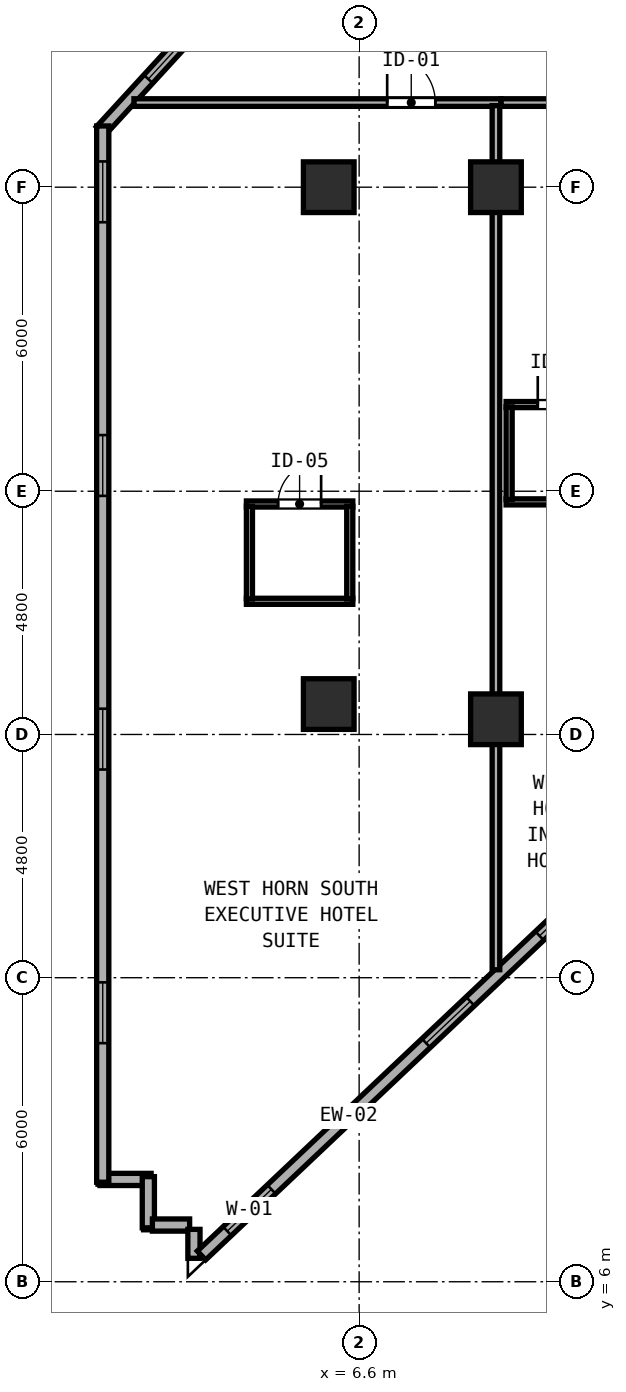
"""IFC4 building model, lengths in metres.
Left out: names, types, materials, properties, quantities, classifications, styles, units other than length and angle.
Written with IfcOpenShell. Run it as: python <this file> out.ifc"""

import sys

from ifc_helpers import new_model, si_unit, direction, frame, frame_2d, origin, origin_2d, place, context, subcontext, project, spatial, rectangle, hollow_rectangle, extrude, element, fill, save


model = new_model("IFC4")
c1 = context("Model", 3, precision=1e-05, world=origin(), true_north=direction((0.0, 1.0)))
c2 = subcontext(c1, "Body", "Model", "MODEL_VIEW")
j1 = project(units=[si_unit("LENGTHUNIT", "METRE"), si_unit("PLANEANGLEUNIT", "RADIAN")], contexts=[c1])
p1 = place(None, origin())
s1 = spatial("IfcSite", under=j1, at=p1, CompositionType="ELEMENT")
p2 = place(p1, origin())
s2 = spatial("IfcBuilding", under=s1, at=p2, CompositionType="ELEMENT")
p3 = place(p2, frame((0.0, 0.0, 59.0)))
s3 = spatial("IfcBuildingStorey", under=s2, at=p3, CompositionType="ELEMENT", Elevation=59.0)
for number, where, z_axis, x_axis in (
    (1, (6.0, 17.4, 0.0), (0.0, 0.0, 1.0), (1.0, 0.0, 0.0)),
    (2, (6.0, 27.6, 0.0), (0.0, 0.0, 1.0), (1.0, 0.0, 0.0)),
    (3, (9.3, 17.1, 0.0), (0.0, 0.0, 1.0), (1.0, 0.0, 0.0)),
    (4, (9.3, 27.6, 0.0), (0.0, 0.0, 1.0), (1.0, 0.0, 0.0)),
):
    element("IfcColumn", number, at=place(p3, frame(where, z_axis=z_axis, x_axis=x_axis)), inside=s3, PredefinedType="COLUMN", context=c2, shape_type="SweptSolid", body=[
        extrude(hollow_rectangle(XDim=1.0, YDim=1.0, WallThickness=0.038, at=origin_2d()), origin(), (0.0, 0.0, 1.0), 3.8),
    ])
for number, where, z_axis, x_axis in (
    (5, (1.485, 8.019, 0.0), (0.0, 0.0, 1.0), (1.0, 0.0, 0.0)),
    (6, (2.44, 8.074, 0.0), (0.0, 0.0, 1.0), (0.0, -1.0, 0.0)),
):
    element("IfcWall", number, at=place(p3, frame(where, z_axis=z_axis, x_axis=x_axis)), inside=s3, PredefinedType="SOLIDWALL", context=c2, shape_type="SweptSolid", body=[
        extrude(rectangle(XDim=1.01, YDim=0.24, at=frame_2d((0.505, 0.0))), origin(), (0.0, 0.0, 1.0), 3.6),
    ])
p4 = place(p3, frame((2.52, 7.119, 0.0), z_axis=(0.0, 0.0, 1.0), x_axis=(1.0, 0.0, 0.0)))
e7 = element("IfcWall", 7, at=p4, inside=s3, PredefinedType="SOLIDWALL", context=c2, shape_type="SweptSolid", body=[
    extrude(rectangle(XDim=0.735, YDim=0.24, at=frame_2d((0.367, 0.0))), origin(), (0.0, 0.0, 1.0), 3.6),
])
p5 = place(p3, frame((3.34, 7.034, 0.0), z_axis=(0.0, 0.0, 1.0), x_axis=(0.0, -1.0, 0.0)))
e8 = element("IfcWall", 8, at=p5, inside=s3, PredefinedType="SOLIDWALL", context=c2, shape_type="SweptSolid", body=[
    extrude(rectangle(XDim=0.571, YDim=0.24, at=frame_2d((0.286, 0.0))), origin(), (0.0, 0.0, 1.0), 3.6),
])
p6 = place(p3, frame((3.489, 6.518, 0.0), z_axis=(0.0, 0.0, 1.0), x_axis=(0.726640160789, 0.687018250652, 0.0)))
e9 = element("IfcWall", 9, at=p6, inside=s3, PredefinedType="SOLIDWALL", context=c2, shape_type="SweptSolid", body=[
    extrude(rectangle(XDim=11.603, YDim=0.24, at=frame_2d((5.801, 0.0))), origin(), (0.0, 0.0, 1.0), 3.6),
])
p7 = place(p6, frame((0.7, 0.0, 0.85)))
e10 = element("IfcOpeningElement", 10, at=p7, cuts=e9, PredefinedType="OPENING", context=c2, shape_type="SweptSolid", body=[
    extrude(rectangle(XDim=1.2, YDim=1.85, at=frame_2d((0.6, 0.925))), frame((0.0, 0.13, 0.0), z_axis=(0.0, -1.0, 0.0), x_axis=(1.0, 0.0, 0.0)), (0.0, 0.0, 1.0), 0.26),
])
p8 = place(p6, frame((6.1, 0.0, 0.85)))
e11 = element("IfcOpeningElement", 11, at=p8, cuts=e9, PredefinedType="OPENING", context=c2, shape_type="SweptSolid", body=[
    extrude(rectangle(XDim=1.2, YDim=1.85, at=frame_2d((0.6, 0.925))), frame((0.0, 0.13, 0.0), z_axis=(0.0, -1.0, 0.0), x_axis=(1.0, 0.0, 0.0)), (0.0, 0.0, 1.0), 0.26),
])
p9 = place(p6, frame((9.18, 0.0, 0.85)))
e12 = element("IfcOpeningElement", 12, at=p9, cuts=e9, PredefinedType="OPENING", context=c2, shape_type="SweptSolid", body=[
    extrude(rectangle(XDim=1.2, YDim=1.85, at=frame_2d((0.6, 0.925))), frame((0.0, 0.13, 0.0), z_axis=(0.0, -1.0, 0.0), x_axis=(1.0, 0.0, 0.0)), (0.0, 0.0, 1.0), 0.26),
])
p10 = place(p3, frame((3.723, 31.135, 0.0), z_axis=(0.0, 0.0, 1.0), x_axis=(-0.675788561887, -0.737095529509, 0.0)))
e13 = element("IfcWall", 13, at=p10, inside=s3, PredefinedType="SOLIDWALL", context=c2, shape_type="SweptSolid", body=[
    extrude(rectangle(XDim=3.285, YDim=0.24, at=frame_2d((1.643, 0.0))), origin(), (0.0, 0.0, 1.0), 3.6),
])
p11 = place(p10, frame((0.7, 0.0, 0.85)))
e14 = element("IfcOpeningElement", 14, at=p11, cuts=e13, PredefinedType="OPENING", context=c2, shape_type="SweptSolid", body=[
    extrude(rectangle(XDim=1.2, YDim=1.85, at=frame_2d((0.6, 0.925))), frame((0.0, 0.13, 0.0), z_axis=(0.0, -1.0, 0.0), x_axis=(1.0, 0.0, 0.0)), (0.0, 0.0, 1.0), 0.26),
])
p12 = place(p3, frame((1.54, 28.808, 0.0), z_axis=(0.0, 0.0, 1.0), x_axis=(0.0, -1.0, 0.0)))
e15 = element("IfcWall", 15, at=p12, inside=s3, PredefinedType="SOLIDWALL", context=c2, shape_type="SweptSolid", body=[
    extrude(rectangle(XDim=20.844, YDim=0.24, at=frame_2d((10.422, 0.0))), origin(), (0.0, 0.0, 1.0), 3.6),
])
p13 = place(p12, frame((0.7, 0.0, 0.85)))
e16 = element("IfcOpeningElement", 16, at=p13, cuts=e15, PredefinedType="OPENING", context=c2, shape_type="SweptSolid", body=[
    extrude(rectangle(XDim=1.2, YDim=1.85, at=frame_2d((0.6, 0.925))), frame((0.0, 0.13, 0.0), z_axis=(0.0, -1.0, 0.0), x_axis=(1.0, 0.0, 0.0)), (0.0, 0.0, 1.0), 0.26),
])
p14 = place(p12, frame((6.1, 0.0, 0.85)))
e17 = element("IfcOpeningElement", 17, at=p14, cuts=e15, PredefinedType="OPENING", context=c2, shape_type="SweptSolid", body=[
    extrude(rectangle(XDim=1.2, YDim=1.85, at=frame_2d((0.6, 0.925))), frame((0.0, 0.13, 0.0), z_axis=(0.0, -1.0, 0.0), x_axis=(1.0, 0.0, 0.0)), (0.0, 0.0, 1.0), 0.26),
])
p15 = place(p12, frame((11.5, 0.0, 0.85)))
e18 = element("IfcOpeningElement", 18, at=p15, cuts=e15, PredefinedType="OPENING", context=c2, shape_type="SweptSolid", body=[
    extrude(rectangle(XDim=1.2, YDim=1.85, at=frame_2d((0.6, 0.925))), frame((0.0, 0.13, 0.0), z_axis=(0.0, -1.0, 0.0), x_axis=(1.0, 0.0, 0.0)), (0.0, 0.0, 1.0), 0.26),
])
p16 = place(p12, frame((16.9, 0.0, 0.85)))
e19 = element("IfcOpeningElement", 19, at=p16, cuts=e15, PredefinedType="OPENING", context=c2, shape_type="SweptSolid", body=[
    extrude(rectangle(XDim=1.2, YDim=1.85, at=frame_2d((0.6, 0.925))), frame((0.0, 0.13, 0.0), z_axis=(0.0, -1.0, 0.0), x_axis=(1.0, 0.0, 0.0)), (0.0, 0.0, 1.0), 0.26),
])
p17 = place(p3, frame((2.156, 29.27, 0.0), z_axis=(0.0, 0.0, 1.0), x_axis=(1.0, 0.0, 0.0)))
e20 = element("IfcWall", 20, at=p17, inside=s3, PredefinedType="PARTITIONING", context=c2, shape_type="SweptSolid", body=[
    extrude(rectangle(XDim=7.244, YDim=0.15, at=frame_2d((3.622, 0.0))), origin(), (0.0, 0.0, 1.0), 3.6),
])
p18 = place(p17, frame((5.947, 0.0, 0.0), z_axis=(0.0, 0.0, 1.0), x_axis=(-1.0, 0.0, 0.0)))
e21 = element("IfcOpeningElement", 21, at=p18, cuts=e20, PredefinedType="OPENING", context=c2, shape_type="SweptSolid", body=[
    extrude(rectangle(XDim=0.95, YDim=2.18, at=frame_2d((0.475, 1.09))), frame((0.0, 0.085, 0.0), z_axis=(0.0, -1.0, 0.0), x_axis=(1.0, 0.0, 0.0)), (0.0, 0.0, 1.0), 0.17),
])
p19 = place(p3, frame((9.3, 12.157, 0.0), z_axis=(0.0, 0.0, 1.0), x_axis=(0.0, 1.0, 0.0)))
e22 = element("IfcWall", 22, at=p19, inside=s3, PredefinedType="PARTITIONING", context=c2, shape_type="SweptSolid", body=[
    extrude(rectangle(XDim=17.053, YDim=0.15, at=frame_2d((8.526, 0.0))), origin(), (0.0, 0.0, 1.0), 3.6),
])
p20 = place(p3, frame((4.375, 21.348, 0.0), z_axis=(0.0, 0.0, 1.0), x_axis=(1.0, 0.0, 0.0)))
e23 = element("IfcWall", 23, at=p20, inside=s3, PredefinedType="PARTITIONING", context=c2, shape_type="SweptSolid", body=[
    extrude(rectangle(XDim=2.1, YDim=0.12, at=frame_2d((1.05, 0.0))), origin(), (0.0, 0.0, 1.0), 3.6),
])
p21 = place(p20, frame((1.475, 0.0, 0.0), z_axis=(0.0, 0.0, 1.0), x_axis=(-1.0, 0.0, 0.0)))
e24 = element("IfcOpeningElement", 24, at=p21, cuts=e23, PredefinedType="OPENING", context=c2, shape_type="SweptSolid", body=[
    extrude(rectangle(XDim=0.85, YDim=2.1, at=frame_2d((0.425, 1.05))), frame((0.0, 0.07, 0.0), z_axis=(0.0, -1.0, 0.0), x_axis=(1.0, 0.0, 0.0)), (0.0, 0.0, 1.0), 0.14),
])
p22 = place(p3, frame((4.375, 19.428, 0.0), z_axis=(0.0, 0.0, 1.0), x_axis=(1.0, 0.0, 0.0)))
e25 = element("IfcWall", 25, at=p22, inside=s3, PredefinedType="PARTITIONING", context=c2, shape_type="SweptSolid", body=[
    extrude(rectangle(XDim=2.1, YDim=0.12, at=frame_2d((1.05, 0.0))), origin(), (0.0, 0.0, 1.0), 3.6),
])
for number, where, z_axis, x_axis in (
    (26, (4.435, 19.473, 0.0), (0.0, 0.0, 1.0), (0.0, 1.0, 0.0)),
    (27, (6.415, 19.473, 0.0), (0.0, 0.0, 1.0), (0.0, 1.0, 0.0)),
):
    element("IfcWall", number, at=place(p3, frame(where, z_axis=z_axis, x_axis=x_axis)), inside=s3, PredefinedType="PARTITIONING", context=c2, shape_type="SweptSolid", body=[
        extrude(rectangle(XDim=1.83, YDim=0.12, at=frame_2d((0.915, 0.0))), origin(), (0.0, 0.0, 1.0), 3.6),
    ])
p23 = place(p3, frame((9.402, 29.27, 0.0), z_axis=(0.0, 0.0, 1.0), x_axis=(1.0, 0.0, 0.0)))
e28 = element("IfcWall", 28, at=p23, inside=s3, PredefinedType="PARTITIONING", context=c2, shape_type="SweptSolid", body=[
    extrude(rectangle(XDim=2.296, YDim=0.15, at=frame_2d((1.148, 0.0))), origin(), (0.0, 0.0, 1.0), 3.6),
])
p24 = place(p23, frame((1.934, 0.0, 0.0), z_axis=(0.0, 0.0, 1.0), x_axis=(-1.0, 0.0, 0.0)))
e29 = element("IfcOpeningElement", 29, at=p24, cuts=e28, PredefinedType="OPENING", context=c2, shape_type="SweptSolid", body=[
    extrude(rectangle(XDim=0.95, YDim=2.15, at=frame_2d((0.475, 1.075))), frame((0.0, 0.085, 0.0), z_axis=(0.0, -1.0, 0.0), x_axis=(1.0, 0.0, 0.0)), (0.0, 0.0, 1.0), 0.17),
])
p25 = place(p3, frame((9.5, 23.31, 0.0), z_axis=(0.0, 0.0, 1.0), x_axis=(1.0, 0.0, 0.0)))
e30 = element("IfcWall", 30, at=p25, inside=s3, PredefinedType="PARTITIONING", context=c2, shape_type="SweptSolid", body=[
    extrude(rectangle(XDim=2.1, YDim=0.12, at=frame_2d((1.05, 0.0))), origin(), (0.0, 0.0, 1.0), 3.6),
])
p26 = place(p25, frame((1.475, 0.0, 0.0), z_axis=(0.0, 0.0, 1.0), x_axis=(-1.0, 0.0, 0.0)))
e31 = element("IfcOpeningElement", 31, at=p26, cuts=e30, PredefinedType="OPENING", context=c2, shape_type="SweptSolid", body=[
    extrude(rectangle(XDim=0.85, YDim=2.1, at=frame_2d((0.425, 1.05))), frame((0.0, 0.07, 0.0), z_axis=(0.0, -1.0, 0.0), x_axis=(1.0, 0.0, 0.0)), (0.0, 0.0, 1.0), 0.14),
])
p27 = place(p3, frame((9.5, 21.39, 0.0), z_axis=(0.0, 0.0, 1.0), x_axis=(1.0, 0.0, 0.0)))
e32 = element("IfcWall", 32, at=p27, inside=s3, PredefinedType="PARTITIONING", context=c2, shape_type="SweptSolid", body=[
    extrude(rectangle(XDim=2.1, YDim=0.12, at=frame_2d((1.05, 0.0))), origin(), (0.0, 0.0, 1.0), 3.6),
])
p28 = place(p3, frame((9.56, 21.435, 0.0), z_axis=(0.0, 0.0, 1.0), x_axis=(0.0, 1.0, 0.0)))
e33 = element("IfcWall", 33, at=p28, inside=s3, PredefinedType="PARTITIONING", context=c2, shape_type="SweptSolid", body=[
    extrude(rectangle(XDim=1.83, YDim=0.12, at=frame_2d((0.915, 0.0))), origin(), (0.0, 0.0, 1.0), 3.6),
])
p29 = place(p7, origin())
e34 = element("IfcWindow", 34, at=p29, inside=s3, PartitioningType="SINGLE_PANEL", PredefinedType="WINDOW", context=c2, shape_type="SweptSolid", body=[
    extrude(rectangle(XDim=1.2, YDim=1.85, at=frame_2d((0.6, 0.925))), frame((0.0, 0.03, 0.0), z_axis=(0.0, -1.0, 0.0), x_axis=(1.0, 0.0, 0.0)), (0.0, 0.0, 1.0), 0.06),
])
fill(e10, e34)
p30 = place(p8, origin())
e35 = element("IfcWindow", 35, at=p30, inside=s3, PartitioningType="SINGLE_PANEL", PredefinedType="WINDOW", context=c2, shape_type="SweptSolid", body=[
    extrude(rectangle(XDim=1.2, YDim=1.85, at=frame_2d((0.6, 0.925))), frame((0.0, 0.03, 0.0), z_axis=(0.0, -1.0, 0.0), x_axis=(1.0, 0.0, 0.0)), (0.0, 0.0, 1.0), 0.06),
])
fill(e11, e35)
p31 = place(p11, origin())
e36 = element("IfcWindow", 36, at=p31, inside=s3, PartitioningType="SINGLE_PANEL", PredefinedType="WINDOW", context=c2, shape_type="SweptSolid", body=[
    extrude(rectangle(XDim=1.2, YDim=1.85, at=frame_2d((0.6, 0.925))), frame((0.0, 0.03, 0.0), z_axis=(0.0, -1.0, 0.0), x_axis=(1.0, 0.0, 0.0)), (0.0, 0.0, 1.0), 0.06),
])
fill(e14, e36)
p32 = place(p13, origin())
e37 = element("IfcWindow", 37, at=p32, inside=s3, PartitioningType="SINGLE_PANEL", PredefinedType="WINDOW", context=c2, shape_type="SweptSolid", body=[
    extrude(rectangle(XDim=1.2, YDim=1.85, at=frame_2d((0.6, 0.925))), frame((0.0, 0.03, 0.0), z_axis=(0.0, -1.0, 0.0), x_axis=(1.0, 0.0, 0.0)), (0.0, 0.0, 1.0), 0.06),
])
fill(e16, e37)
p33 = place(p14, origin())
e38 = element("IfcWindow", 38, at=p33, inside=s3, PartitioningType="SINGLE_PANEL", PredefinedType="WINDOW", context=c2, shape_type="SweptSolid", body=[
    extrude(rectangle(XDim=1.2, YDim=1.85, at=frame_2d((0.6, 0.925))), frame((0.0, 0.03, 0.0), z_axis=(0.0, -1.0, 0.0), x_axis=(1.0, 0.0, 0.0)), (0.0, 0.0, 1.0), 0.06),
])
fill(e17, e38)
p34 = place(p15, origin())
e39 = element("IfcWindow", 39, at=p34, inside=s3, PartitioningType="SINGLE_PANEL", PredefinedType="WINDOW", context=c2, shape_type="SweptSolid", body=[
    extrude(rectangle(XDim=1.2, YDim=1.85, at=frame_2d((0.6, 0.925))), frame((0.0, 0.03, 0.0), z_axis=(0.0, -1.0, 0.0), x_axis=(1.0, 0.0, 0.0)), (0.0, 0.0, 1.0), 0.06),
])
fill(e18, e39)
p35 = place(p16, origin())
e40 = element("IfcWindow", 40, at=p35, inside=s3, PartitioningType="SINGLE_PANEL", PredefinedType="WINDOW", context=c2, shape_type="SweptSolid", body=[
    extrude(rectangle(XDim=1.2, YDim=1.85, at=frame_2d((0.6, 0.925))), frame((0.0, 0.03, 0.0), z_axis=(0.0, -1.0, 0.0), x_axis=(1.0, 0.0, 0.0)), (0.0, 0.0, 1.0), 0.06),
])
fill(e19, e40)
p36 = place(p18, origin())
e41 = element("IfcDoor", 41, at=p36, inside=s3, OperationType="SINGLE_SWING_RIGHT", PredefinedType="DOOR", context=c2, shape_type="SweptSolid", body=[
    extrude(rectangle(XDim=0.95, YDim=2.18, at=frame_2d((0.475, 1.09))), frame((0.0, 0.025, 0.0), z_axis=(0.0, -1.0, 0.0), x_axis=(1.0, 0.0, 0.0)), (0.0, 0.0, 1.0), 0.05),
])
fill(e21, e41)
p37 = place(p21, origin())
e42 = element("IfcDoor", 42, at=p37, inside=s3, OperationType="SINGLE_SWING_LEFT", PredefinedType="DOOR", context=c2, shape_type="SweptSolid", body=[
    extrude(rectangle(XDim=0.85, YDim=2.1, at=frame_2d((0.425, 1.05))), frame((0.0, 0.025, 0.0), z_axis=(0.0, -1.0, 0.0), x_axis=(1.0, 0.0, 0.0)), (0.0, 0.0, 1.0), 0.05),
])
fill(e24, e42)
p38 = place(p26, origin())
e43 = element("IfcDoor", 43, at=p38, inside=s3, OperationType="SINGLE_SWING_RIGHT", PredefinedType="DOOR", context=c2, shape_type="SweptSolid", body=[
    extrude(rectangle(XDim=0.85, YDim=2.1, at=frame_2d((0.425, 1.05))), frame((0.0, 0.025, 0.0), z_axis=(0.0, -1.0, 0.0), x_axis=(1.0, 0.0, 0.0)), (0.0, 0.0, 1.0), 0.05),
])
fill(e31, e43)
p39 = place(p9, origin())
e44 = element("IfcWindow", 44, at=p39, inside=s3, PartitioningType="SINGLE_PANEL", PredefinedType="WINDOW", context=c2, shape_type="SweptSolid", body=[
    extrude(rectangle(XDim=1.2, YDim=1.85, at=frame_2d((0.6, 0.925))), frame((0.0, 0.03, 0.0), z_axis=(0.0, -1.0, 0.0), x_axis=(1.0, 0.0, 0.0)), (0.0, 0.0, 1.0), 0.06),
])
fill(e12, e44)
save(model, sys.argv[1])
